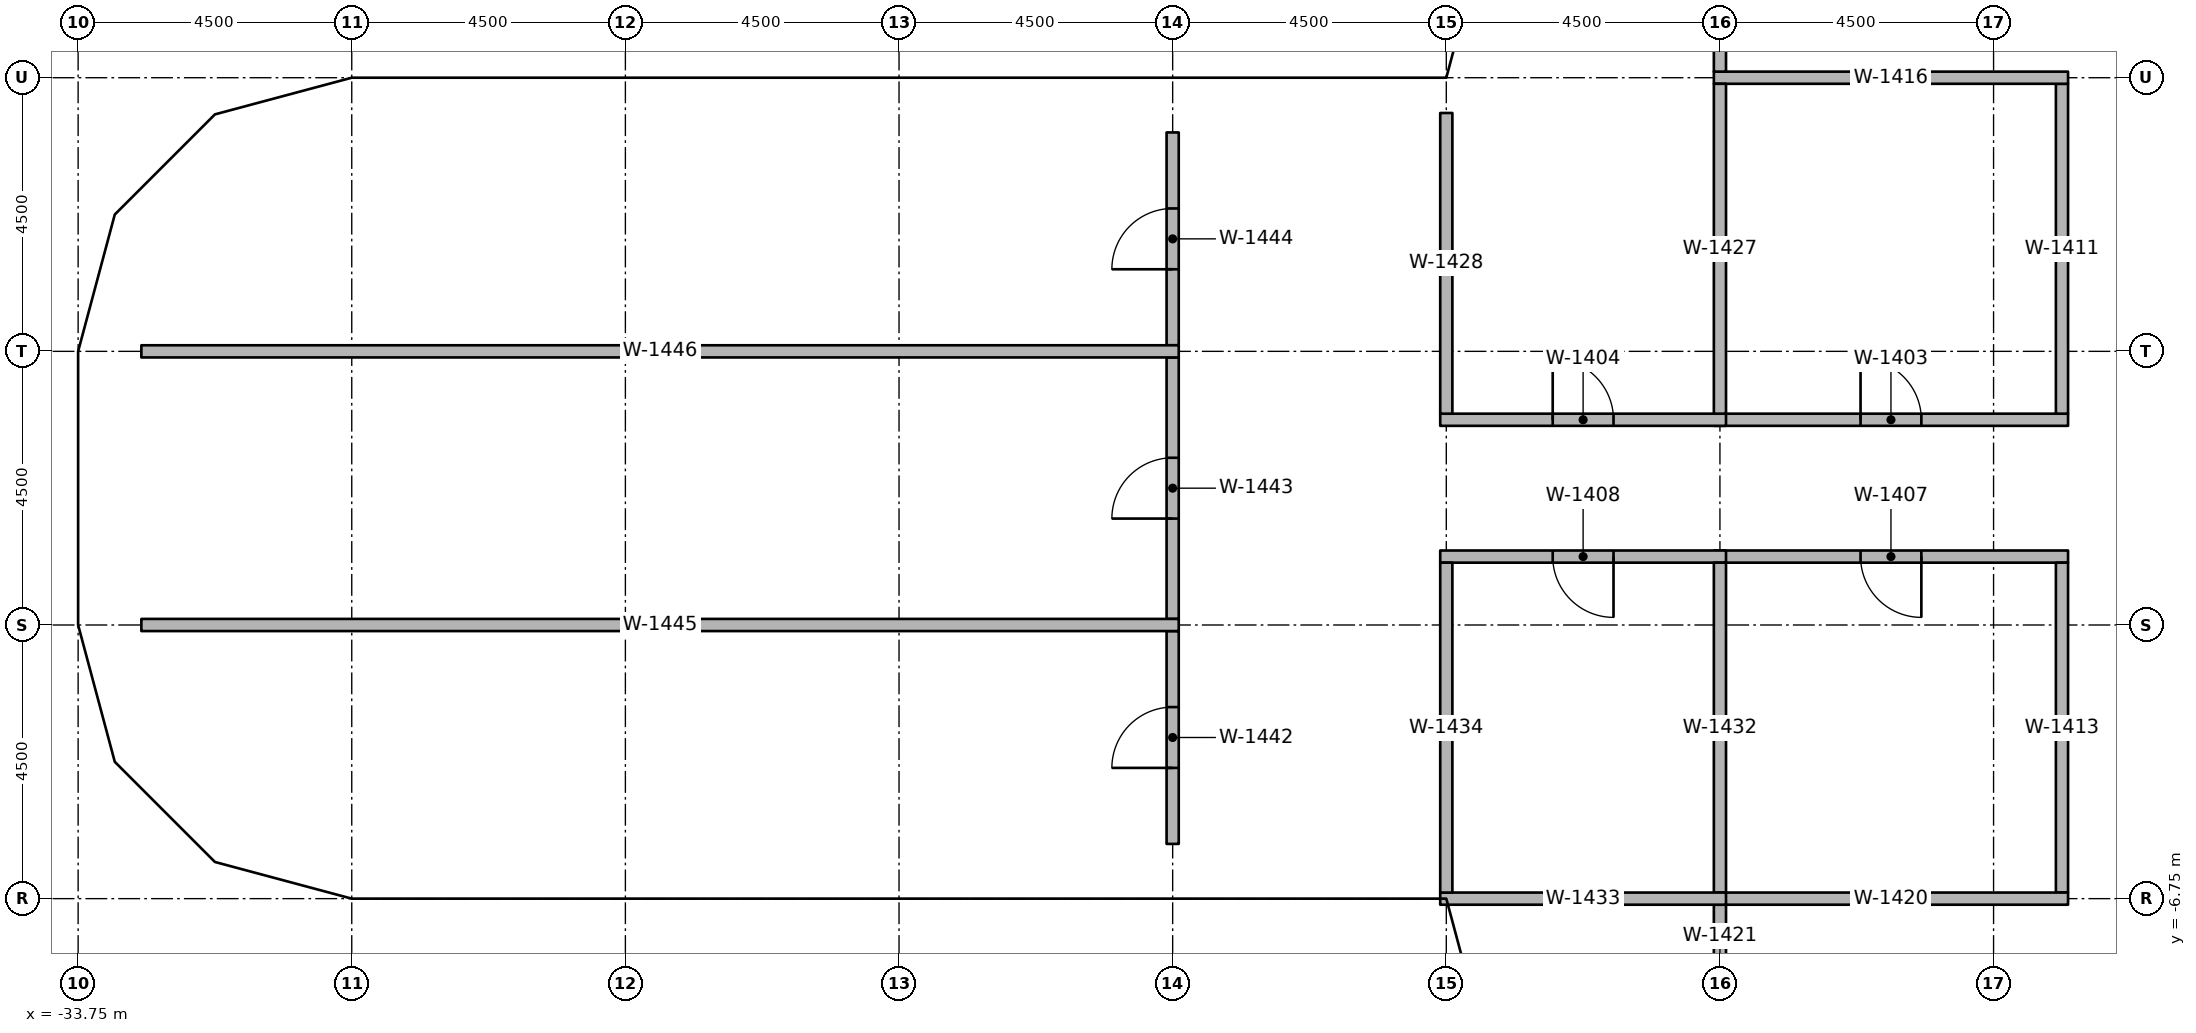
"""IFC4 building model, lengths in metres.
Left out: names, types, materials, properties, quantities, classifications, styles, units other than length and angle.
Written with IfcOpenShell. Run it as: python <this file> out.ifc"""

import sys

from ifc_helpers import new_model, si_unit, direction, frame, frame_2d, origin, origin_2d, place, context, subcontext, project, spatial, rectangle, extrude, element, fill, save


model = new_model("IFC4")
c1 = context("Model", 3, precision=1e-05, world=origin(), true_north=direction((0.0, 1.0)))
c2 = subcontext(c1, "Body", "Model", "MODEL_VIEW")
j1 = project(units=[si_unit("LENGTHUNIT", "METRE"), si_unit("PLANEANGLEUNIT", "RADIAN")], contexts=[c1])
p1 = place(None, origin())
s1 = spatial("IfcSite", under=j1, at=p1, CompositionType="ELEMENT")
p2 = place(p1, origin())
s2 = spatial("IfcBuilding", under=s1, at=p2, CompositionType="ELEMENT")
p3 = place(p2, frame((0.0, 0.0, 141.0)))
s3 = spatial("IfcBuildingStorey", under=s2, at=p3, CompositionType="ELEMENT", Elevation=141.0)
for number, where, z_axis, x_axis in (
    (1, (-33.11, -2.25, 0.0), (0.0, 0.0, 1.0), (1.0, 0.0, 0.0)),
    (2, (-33.11, 2.25, 0.0), (0.0, 0.0, 1.0), (1.0, 0.0, 0.0)),
    (3, (-28.908, -5.475, 0.0), (0.0, 0.0, 1.0), (1.0, 0.0, 0.0)),
    (4, (-28.908, 5.475, 0.0), (0.0, 0.0, 1.0), (1.0, 0.0, 0.0)),
    (5, (-24.75, -6.25, 0.0), (0.0, 0.0, 1.0), (1.0, 0.0, 0.0)),
    (6, (-24.75, 6.25, 0.0), (0.0, 0.0, 1.0), (1.0, 0.0, 0.0)),
    (7, (-20.25, -6.11, 0.0), (0.0, 0.0, 1.0), (1.0, 0.0, 0.0)),
    (8, (-20.25, 6.11, 0.0), (0.0, 0.0, 1.0), (1.0, 0.0, 0.0)),
    (9, (-15.75, -6.25, 0.0), (0.0, 0.0, 1.0), (1.0, 0.0, 0.0)),
    (10, (-15.75, 6.25, 0.0), (0.0, 0.0, 1.0), (1.0, 0.0, 0.0)),
    (11, (-10.75, -6.25, 0.0), (0.0, 0.0, 1.0), (1.0, 0.0, 0.0)),
    (12, (-10.75, 6.25, 0.0), (0.0, 0.0, 1.0), (1.0, 0.0, 0.0)),
    (13, (-6.25, -6.25, 0.0), (0.0, 0.0, 1.0), (1.0, 0.0, 0.0)),
    (14, (-6.25, 6.25, 0.0), (0.0, 0.0, 1.0), (1.0, 0.0, 0.0)),
):
    element("IfcColumn", number, at=place(p3, frame(where, z_axis=z_axis, x_axis=x_axis)), inside=s3, PredefinedType="COLUMN", context=c2, shape_type="SweptSolid", body=[
        extrude(rectangle(XDim=0.8, YDim=0.8, at=origin_2d()), origin(), (0.0, 0.0, 1.0), 3.65),
    ])
p4 = place(p3, frame((-6.85, 1.125, 0.0), z_axis=(0.0, 0.0, 1.0), x_axis=(1.0, 0.0, 0.0)))
e15 = element("IfcWall", 15, at=p4, inside=s3, PredefinedType="PARTITIONING", context=c2, shape_type="SweptSolid", body=[
    extrude(rectangle(XDim=5.825, YDim=0.2, at=frame_2d((2.913, 0.0))), origin(), (0.0, 0.0, 1.0), 2.75),
])
p5 = place(p4, frame((2.413, 0.0, 0.0)))
e16 = element("IfcOpeningElement", 16, at=p5, cuts=e15, PredefinedType="OPENING", context=c2, shape_type="SweptSolid", body=[
    extrude(rectangle(XDim=1.0, YDim=2.1, at=frame_2d((0.5, 1.05))), frame((0.0, 0.11, 0.0), z_axis=(0.0, -1.0, 0.0), x_axis=(1.0, 0.0, 0.0)), (0.0, 0.0, 1.0), 0.22),
])
p6 = place(p3, frame((-11.35, 1.125, 0.0), z_axis=(0.0, 0.0, 1.0), x_axis=(1.0, 0.0, 0.0)))
e17 = element("IfcWall", 17, at=p6, inside=s3, PredefinedType="PARTITIONING", context=c2, shape_type="SweptSolid", body=[
    extrude(rectangle(XDim=4.7, YDim=0.2, at=frame_2d((2.35, 0.0))), origin(), (0.0, 0.0, 1.0), 2.75),
])
p7 = place(p6, frame((1.85, 0.0, 0.0)))
e18 = element("IfcOpeningElement", 18, at=p7, cuts=e17, PredefinedType="OPENING", context=c2, shape_type="SweptSolid", body=[
    extrude(rectangle(XDim=1.0, YDim=2.1, at=frame_2d((0.5, 1.05))), frame((0.0, 0.11, 0.0), z_axis=(0.0, -1.0, 0.0), x_axis=(1.0, 0.0, 0.0)), (0.0, 0.0, 1.0), 0.22),
])
p8 = place(p3, frame((-1.025, -1.125, 0.0), z_axis=(0.0, 0.0, 1.0), x_axis=(-1.0, 0.0, 0.0)))
e19 = element("IfcWall", 19, at=p8, inside=s3, PredefinedType="PARTITIONING", context=c2, shape_type="SweptSolid", body=[
    extrude(rectangle(XDim=5.825, YDim=0.2, at=frame_2d((2.913, 0.0))), origin(), (0.0, 0.0, 1.0), 2.75),
])
p9 = place(p8, frame((2.413, 0.0, 0.0)))
e20 = element("IfcOpeningElement", 20, at=p9, cuts=e19, PredefinedType="OPENING", context=c2, shape_type="SweptSolid", body=[
    extrude(rectangle(XDim=1.0, YDim=2.1, at=frame_2d((0.5, 1.05))), frame((0.0, 0.11, 0.0), z_axis=(0.0, -1.0, 0.0), x_axis=(1.0, 0.0, 0.0)), (0.0, 0.0, 1.0), 0.22),
])
p10 = place(p3, frame((-6.65, -1.125, 0.0), z_axis=(0.0, 0.0, 1.0), x_axis=(-1.0, 0.0, 0.0)))
e21 = element("IfcWall", 21, at=p10, inside=s3, PredefinedType="PARTITIONING", context=c2, shape_type="SweptSolid", body=[
    extrude(rectangle(XDim=4.7, YDim=0.2, at=frame_2d((2.35, 0.0))), origin(), (0.0, 0.0, 1.0), 2.75),
])
p11 = place(p10, frame((1.85, 0.0, 0.0)))
e22 = element("IfcOpeningElement", 22, at=p11, cuts=e21, PredefinedType="OPENING", context=c2, shape_type="SweptSolid", body=[
    extrude(rectangle(XDim=1.0, YDim=2.1, at=frame_2d((0.5, 1.05))), frame((0.0, 0.11, 0.0), z_axis=(0.0, -1.0, 0.0), x_axis=(1.0, 0.0, 0.0)), (0.0, 0.0, 1.0), 0.22),
])
for number, where, z_axis, x_axis in (
    (23, (-1.125, 1.225, 0.0), (0.0, 0.0, 1.0), (0.0, 1.0, 0.0)),
    (24, (-1.125, -6.65, 0.0), (0.0, 0.0, 1.0), (0.0, 1.0, 0.0)),
):
    element("IfcWall", number, at=place(p3, frame(where, z_axis=z_axis, x_axis=x_axis)), inside=s3, PredefinedType="PARTITIONING", context=c2, shape_type="SweptSolid", body=[
        extrude(rectangle(XDim=5.425, YDim=0.2, at=frame_2d((2.712, 0.0))), origin(), (0.0, 0.0, 1.0), 2.75),
    ])
p12 = place(p3, frame((-6.85, 6.75, 0.0), z_axis=(0.0, 0.0, 1.0), x_axis=(1.0, 0.0, 0.0)))
e25 = element("IfcWall", 25, at=p12, inside=s3, PredefinedType="PARTITIONING", context=c2, shape_type="SweptSolid", body=[
    extrude(rectangle(XDim=5.825, YDim=0.2, at=frame_2d((2.913, 0.0))), origin(), (0.0, 0.0, 1.0), 2.75),
])
p13 = place(p3, frame((-6.75, 6.85, 0.0), z_axis=(0.0, 0.0, 1.0), x_axis=(0.0, 1.0, 0.0)))
e26 = element("IfcWall", 26, at=p13, inside=s3, PredefinedType="PARTITIONING", context=c2, shape_type="SweptSolid", body=[
    extrude(rectangle(XDim=3.78, YDim=0.2, at=frame_2d((1.89, 0.0))), origin(), (0.0, 0.0, 1.0), 2.75),
])
p14 = place(p3, frame((-6.85, -6.75, 0.0), z_axis=(0.0, 0.0, 1.0), x_axis=(1.0, 0.0, 0.0)))
e27 = element("IfcWall", 27, at=p14, inside=s3, PredefinedType="PARTITIONING", context=c2, shape_type="SweptSolid", body=[
    extrude(rectangle(XDim=5.825, YDim=0.2, at=frame_2d((2.913, 0.0))), origin(), (0.0, 0.0, 1.0), 2.75),
])
p15 = place(p3, frame((-6.75, -10.63, 0.0), z_axis=(0.0, 0.0, 1.0), x_axis=(0.0, 1.0, 0.0)))
e28 = element("IfcWall", 28, at=p15, inside=s3, PredefinedType="PARTITIONING", context=c2, shape_type="SweptSolid", body=[
    extrude(rectangle(XDim=3.78, YDim=0.2, at=frame_2d((1.89, 0.0))), origin(), (0.0, 0.0, 1.0), 2.75),
])
p16 = place(p15, frame((1.44, 0.0, 0.0)))
e29 = element("IfcOpeningElement", 29, at=p16, cuts=e28, PredefinedType="OPENING", context=c2, shape_type="SweptSolid", body=[
    extrude(rectangle(XDim=0.9, YDim=2.1, at=frame_2d((0.45, 1.05))), frame((0.0, 0.11, 0.0), z_axis=(0.0, -1.0, 0.0), x_axis=(1.0, 0.0, 0.0)), (0.0, 0.0, 1.0), 0.22),
])
p17 = place(p3, frame((-6.75, 1.225, 0.0), z_axis=(0.0, 0.0, 1.0), x_axis=(0.0, 1.0, 0.0)))
e30 = element("IfcWall", 30, at=p17, inside=s3, PredefinedType="PARTITIONING", context=c2, shape_type="SweptSolid", body=[
    extrude(rectangle(XDim=5.425, YDim=0.2, at=frame_2d((2.712, 0.0))), origin(), (0.0, 0.0, 1.0), 2.75),
])
p18 = place(p3, frame((-11.25, 1.225, 0.0), z_axis=(0.0, 0.0, 1.0), x_axis=(0.0, 1.0, 0.0)))
e31 = element("IfcWall", 31, at=p18, inside=s3, PredefinedType="PARTITIONING", context=c2, shape_type="SweptSolid", body=[
    extrude(rectangle(XDim=4.945, YDim=0.2, at=frame_2d((2.472, 0.0))), origin(), (0.0, 0.0, 1.0), 2.75),
])
p19 = place(p3, frame((-6.75, -6.65, 0.0), z_axis=(0.0, 0.0, 1.0), x_axis=(0.0, 1.0, 0.0)))
e32 = element("IfcWall", 32, at=p19, inside=s3, PredefinedType="PARTITIONING", context=c2, shape_type="SweptSolid", body=[
    extrude(rectangle(XDim=5.425, YDim=0.2, at=frame_2d((2.712, 0.0))), origin(), (0.0, 0.0, 1.0), 2.75),
])
p20 = place(p3, frame((-11.35, -6.75, 0.0), z_axis=(0.0, 0.0, 1.0), x_axis=(1.0, 0.0, 0.0)))
e33 = element("IfcWall", 33, at=p20, inside=s3, PredefinedType="PARTITIONING", context=c2, shape_type="SweptSolid", body=[
    extrude(rectangle(XDim=4.7, YDim=0.2, at=frame_2d((2.35, 0.0))), origin(), (0.0, 0.0, 1.0), 2.75),
])
p21 = place(p3, frame((-11.25, -6.65, 0.0), z_axis=(0.0, 0.0, 1.0), x_axis=(0.0, 1.0, 0.0)))
e34 = element("IfcWall", 34, at=p21, inside=s3, PredefinedType="PARTITIONING", context=c2, shape_type="SweptSolid", body=[
    extrude(rectangle(XDim=5.425, YDim=0.2, at=frame_2d((2.712, 0.0))), origin(), (0.0, 0.0, 1.0), 2.75),
])
p22 = place(p3, frame((-15.75, -5.85, 0.0), z_axis=(0.0, 0.0, 1.0), x_axis=(0.0, 1.0, 0.0)))
e35 = element("IfcWall", 35, at=p22, inside=s3, PredefinedType="PARTITIONING", context=c2, shape_type="SweptSolid", body=[
    extrude(rectangle(XDim=3.5, YDim=0.2, at=frame_2d((1.75, 0.0))), origin(), (0.0, 0.0, 1.0), 2.75),
])
p23 = place(p22, frame((1.25, 0.0, 0.0)))
e36 = element("IfcOpeningElement", 36, at=p23, cuts=e35, PredefinedType="OPENING", context=c2, shape_type="SweptSolid", body=[
    extrude(rectangle(XDim=1.0, YDim=2.1, at=frame_2d((0.5, 1.05))), frame((0.0, 0.11, 0.0), z_axis=(0.0, -1.0, 0.0), x_axis=(1.0, 0.0, 0.0)), (0.0, 0.0, 1.0), 0.22),
])
p24 = place(p3, frame((-15.75, -2.15, 0.0), z_axis=(0.0, 0.0, 1.0), x_axis=(0.0, 1.0, 0.0)))
e37 = element("IfcWall", 37, at=p24, inside=s3, PredefinedType="PARTITIONING", context=c2, shape_type="SweptSolid", body=[
    extrude(rectangle(XDim=4.3, YDim=0.2, at=frame_2d((2.15, 0.0))), origin(), (0.0, 0.0, 1.0), 2.75),
])
p25 = place(p24, frame((1.65, 0.0, 0.0)))
e38 = element("IfcOpeningElement", 38, at=p25, cuts=e37, PredefinedType="OPENING", context=c2, shape_type="SweptSolid", body=[
    extrude(rectangle(XDim=1.0, YDim=2.1, at=frame_2d((0.5, 1.05))), frame((0.0, 0.11, 0.0), z_axis=(0.0, -1.0, 0.0), x_axis=(1.0, 0.0, 0.0)), (0.0, 0.0, 1.0), 0.22),
])
p26 = place(p3, frame((-15.75, 2.35, 0.0), z_axis=(0.0, 0.0, 1.0), x_axis=(0.0, 1.0, 0.0)))
e39 = element("IfcWall", 39, at=p26, inside=s3, PredefinedType="PARTITIONING", context=c2, shape_type="SweptSolid", body=[
    extrude(rectangle(XDim=3.5, YDim=0.2, at=frame_2d((1.75, 0.0))), origin(), (0.0, 0.0, 1.0), 2.75),
])
p27 = place(p26, frame((1.25, 0.0, 0.0)))
e40 = element("IfcOpeningElement", 40, at=p27, cuts=e39, PredefinedType="OPENING", context=c2, shape_type="SweptSolid", body=[
    extrude(rectangle(XDim=1.0, YDim=2.1, at=frame_2d((0.5, 1.05))), frame((0.0, 0.11, 0.0), z_axis=(0.0, -1.0, 0.0), x_axis=(1.0, 0.0, 0.0)), (0.0, 0.0, 1.0), 0.22),
])
for number, where, z_axis, x_axis in (
    (41, (-32.71, -2.25, 0.0), (0.0, 0.0, 1.0), (1.0, 0.0, 0.0)),
    (42, (-32.71, 2.25, 0.0), (0.0, 0.0, 1.0), (1.0, 0.0, 0.0)),
):
    element("IfcWall", number, at=place(p3, frame(where, z_axis=z_axis, x_axis=x_axis)), inside=s3, PredefinedType="PARTITIONING", context=c2, shape_type="SweptSolid", body=[
        extrude(rectangle(XDim=17.06, YDim=0.2, at=frame_2d((8.53, 0.0))), origin(), (0.0, 0.0, 1.0), 2.75),
    ])
p28 = place(p5, origin())
e43 = element("IfcDoor", 43, at=p28, inside=s3, OperationType="SINGLE_SWING_RIGHT", PredefinedType="DOOR", context=c2, shape_type="SweptSolid", body=[
    extrude(rectangle(XDim=1.0, YDim=2.1, at=frame_2d((0.5, 1.05))), frame((0.0, 0.025, 0.0), z_axis=(0.0, -1.0, 0.0), x_axis=(1.0, 0.0, 0.0)), (0.0, 0.0, 1.0), 0.05),
])
fill(e16, e43)
p29 = place(p7, origin())
e44 = element("IfcDoor", 44, at=p29, inside=s3, OperationType="SINGLE_SWING_RIGHT", PredefinedType="DOOR", context=c2, shape_type="SweptSolid", body=[
    extrude(rectangle(XDim=1.0, YDim=2.1, at=frame_2d((0.5, 1.05))), frame((0.0, 0.025, 0.0), z_axis=(0.0, -1.0, 0.0), x_axis=(1.0, 0.0, 0.0)), (0.0, 0.0, 1.0), 0.05),
])
fill(e18, e44)
p30 = place(p9, origin())
e45 = element("IfcDoor", 45, at=p30, inside=s3, OperationType="SINGLE_SWING_RIGHT", PredefinedType="DOOR", context=c2, shape_type="SweptSolid", body=[
    extrude(rectangle(XDim=1.0, YDim=2.1, at=frame_2d((0.5, 1.05))), frame((0.0, 0.025, 0.0), z_axis=(0.0, -1.0, 0.0), x_axis=(1.0, 0.0, 0.0)), (0.0, 0.0, 1.0), 0.05),
])
fill(e20, e45)
p31 = place(p11, origin())
e46 = element("IfcDoor", 46, at=p31, inside=s3, OperationType="SINGLE_SWING_RIGHT", PredefinedType="DOOR", context=c2, shape_type="SweptSolid", body=[
    extrude(rectangle(XDim=1.0, YDim=2.1, at=frame_2d((0.5, 1.05))), frame((0.0, 0.025, 0.0), z_axis=(0.0, -1.0, 0.0), x_axis=(1.0, 0.0, 0.0)), (0.0, 0.0, 1.0), 0.05),
])
fill(e22, e46)
p32 = place(p23, origin())
e47 = element("IfcDoor", 47, at=p32, inside=s3, OperationType="SINGLE_SWING_RIGHT", PredefinedType="DOOR", context=c2, shape_type="SweptSolid", body=[
    extrude(rectangle(XDim=1.0, YDim=2.1, at=frame_2d((0.5, 1.05))), frame((0.0, 0.025, 0.0), z_axis=(0.0, -1.0, 0.0), x_axis=(1.0, 0.0, 0.0)), (0.0, 0.0, 1.0), 0.05),
])
fill(e36, e47)
p33 = place(p25, origin())
e48 = element("IfcDoor", 48, at=p33, inside=s3, OperationType="SINGLE_SWING_RIGHT", PredefinedType="DOOR", context=c2, shape_type="SweptSolid", body=[
    extrude(rectangle(XDim=1.0, YDim=2.1, at=frame_2d((0.5, 1.05))), frame((0.0, 0.025, 0.0), z_axis=(0.0, -1.0, 0.0), x_axis=(1.0, 0.0, 0.0)), (0.0, 0.0, 1.0), 0.05),
])
fill(e38, e48)
p34 = place(p27, origin())
e49 = element("IfcDoor", 49, at=p34, inside=s3, OperationType="SINGLE_SWING_LEFT", PredefinedType="DOOR", context=c2, shape_type="SweptSolid", body=[
    extrude(rectangle(XDim=1.0, YDim=2.1, at=frame_2d((0.5, 1.05))), frame((0.0, 0.025, 0.0), z_axis=(0.0, -1.0, 0.0), x_axis=(1.0, 0.0, 0.0)), (0.0, 0.0, 1.0), 0.05),
])
fill(e40, e49)
save(model, sys.argv[1])
